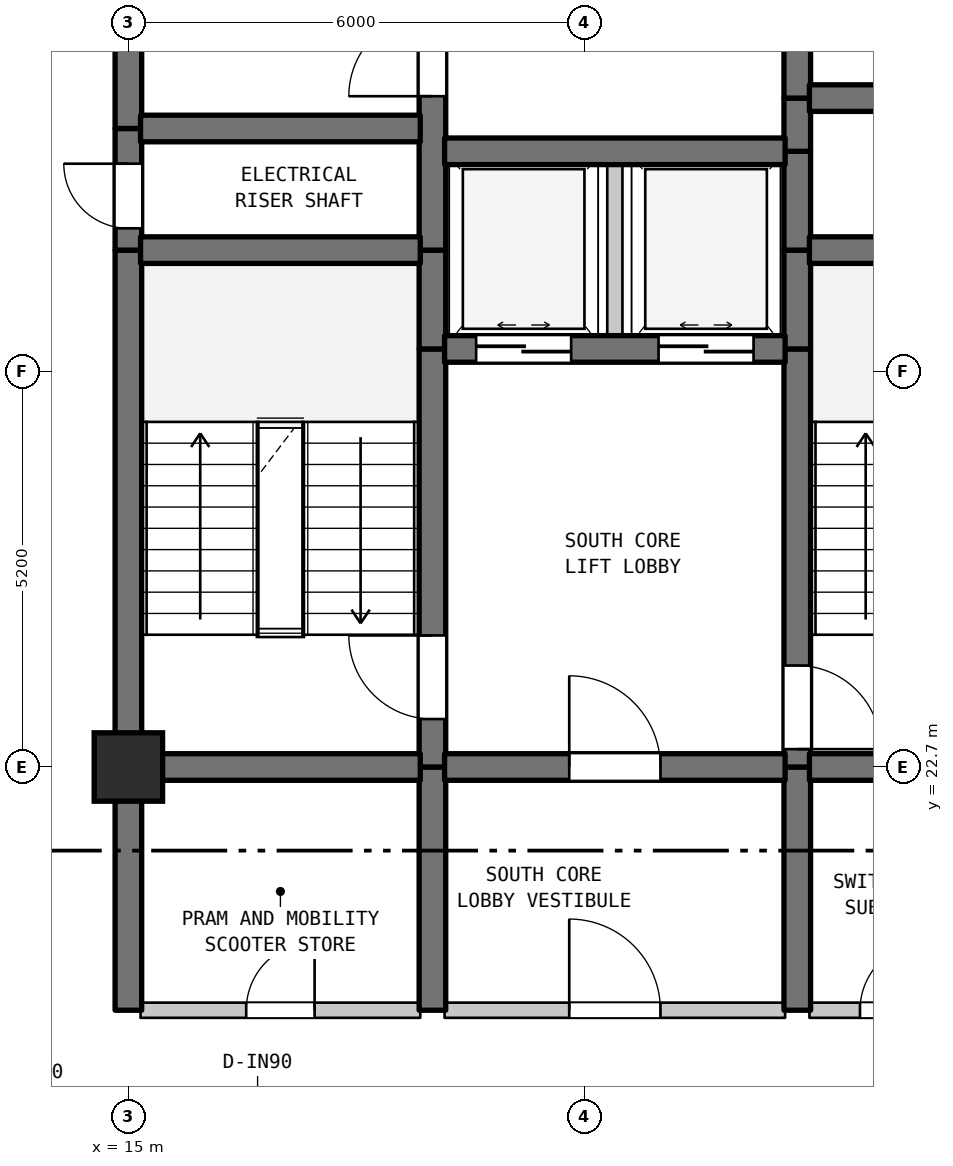
"""IFC4 building model, lengths in metres.
Left out: names, types, materials, properties, quantities, classifications, styles, units other than length and angle.
Written with IfcOpenShell. Run it as: python <this file> out.ifc"""

import sys

from ifc_helpers import new_model, si_unit, direction, frame, frame_2d, origin, origin_2d, place, context, subcontext, project, spatial, rectangle, extrude, element, fill, save


model = new_model("IFC4")
c1 = context("Model", 3, precision=1e-05, world=origin(), true_north=direction((0.0, 1.0)))
c2 = subcontext(c1, "Body", "Model", "MODEL_VIEW")
j1 = project(units=[si_unit("LENGTHUNIT", "METRE"), si_unit("PLANEANGLEUNIT", "RADIAN")], contexts=[c1])
p1 = place(None, origin())
s1 = spatial("IfcSite", under=j1, at=p1, CompositionType="ELEMENT")
p2 = place(p1, origin())
s2 = spatial("IfcBuilding", under=s1, at=p2, CompositionType="ELEMENT")
p3 = place(p2, frame((0.0, 0.0, 203.2)))
s3 = spatial("IfcBuildingStorey", under=s2, at=p3, CompositionType="ELEMENT", Elevation=203.2)
p4 = place(p3, frame((15.0, 22.7, 0.0), z_axis=(0.0, 0.0, 1.0), x_axis=(1.0, 0.0, 0.0)))
e1 = element("IfcColumn", 1, at=p4, inside=s3, PredefinedType="COLUMN", context=c2, shape_type="SweptSolid", body=[
    extrude(rectangle(XDim=0.9, YDim=0.9, at=origin_2d()), origin(), (0.0, 0.0, 1.0), 3.7),
])
p5 = place(p3, frame((15.0, 19.5, 0.0), z_axis=(0.0, 0.0, 1.0), x_axis=(0.0, 1.0, 0.0)))
e2 = element("IfcWall", 2, at=p5, inside=s3, PredefinedType="SHEAR", context=c2, shape_type="SweptSolid", body=[
    extrude(rectangle(XDim=3.2, YDim=0.35, at=frame_2d((1.6, 0.0))), origin(), (0.0, 0.0, 1.0), 3.39),
])
p6 = place(p3, frame((15.0, 22.7, 0.0), z_axis=(0.0, 0.0, 1.0), x_axis=(0.0, 1.0, 0.0)))
e3 = element("IfcWall", 3, at=p6, inside=s3, PredefinedType="SHEAR", context=c2, shape_type="SweptSolid", body=[
    extrude(rectangle(XDim=6.8, YDim=0.35, at=frame_2d((3.4, 0.0))), origin(), (0.0, 0.0, 1.0), 3.39),
])
p7 = place(p3, frame((15.0, 29.5, 0.0), z_axis=(0.0, 0.0, 1.0), x_axis=(0.0, 1.0, 0.0)))
e4 = element("IfcWall", 4, at=p7, inside=s3, PredefinedType="SHEAR", context=c2, shape_type="SweptSolid", body=[
    extrude(rectangle(XDim=1.6, YDim=0.35, at=frame_2d((0.8, 0.0))), origin(), (0.0, 0.0, 1.0), 3.39),
])
p8 = place(p7, frame((0.287, 0.0, 0.0)))
e5 = element("IfcOpeningElement", 5, at=p8, cuts=e4, PredefinedType="OPENING", context=c2, shape_type="SweptSolid", body=[
    extrude(rectangle(XDim=0.85, YDim=2.1, at=frame_2d((0.425, 1.05))), frame((0.0, 0.185, 0.0), z_axis=(0.0, -1.0, 0.0), x_axis=(1.0, 0.0, 0.0)), (0.0, 0.0, 1.0), 0.37),
])
p9 = place(p3, frame((15.0, 31.1, 0.0), z_axis=(0.0, 0.0, 1.0), x_axis=(0.0, 1.0, 0.0)))
e6 = element("IfcWall", 6, at=p9, inside=s3, PredefinedType="SHEAR", context=c2, shape_type="SweptSolid", body=[
    extrude(rectangle(XDim=6.8, YDim=0.35, at=frame_2d((3.4, 0.0))), origin(), (0.0, 0.0, 1.0), 3.39),
])
p10 = place(p3, frame((19.0, 19.5, 0.0), z_axis=(0.0, 0.0, 1.0), x_axis=(0.0, 1.0, 0.0)))
e7 = element("IfcWall", 7, at=p10, inside=s3, PredefinedType="SHEAR", context=c2, shape_type="SweptSolid", body=[
    extrude(rectangle(XDim=3.2, YDim=0.35, at=frame_2d((1.6, 0.0))), origin(), (0.0, 0.0, 1.0), 3.39),
])
p11 = place(p3, frame((19.0, 22.7, 0.0), z_axis=(0.0, 0.0, 1.0), x_axis=(0.0, 1.0, 0.0)))
e8 = element("IfcWall", 8, at=p11, inside=s3, PredefinedType="SHEAR", context=c2, shape_type="SweptSolid", body=[
    extrude(rectangle(XDim=5.5, YDim=0.35, at=frame_2d((2.75, 0.0))), origin(), (0.0, 0.0, 1.0), 3.39),
])
p12 = place(p11, frame((0.631, 0.0, 0.0)))
e9 = element("IfcOpeningElement", 9, at=p12, cuts=e8, PredefinedType="OPENING", context=c2, shape_type="SweptSolid", body=[
    extrude(rectangle(XDim=1.1, YDim=2.15, at=frame_2d((0.55, 1.075))), frame((0.0, 0.185, 0.0), z_axis=(0.0, -1.0, 0.0), x_axis=(1.0, 0.0, 0.0)), (0.0, 0.0, 1.0), 0.37),
])
p13 = place(p3, frame((19.0, 28.2, 0.0), z_axis=(0.0, 0.0, 1.0), x_axis=(0.0, 1.0, 0.0)))
e10 = element("IfcWall", 10, at=p13, inside=s3, PredefinedType="SHEAR", context=c2, shape_type="SweptSolid", body=[
    extrude(rectangle(XDim=1.3, YDim=0.35, at=frame_2d((0.65, 0.0))), origin(), (0.0, 0.0, 1.0), 3.39),
])
p14 = place(p3, frame((19.0, 29.5, 0.0), z_axis=(0.0, 0.0, 1.0), x_axis=(0.0, 1.0, 0.0)))
e11 = element("IfcWall", 11, at=p14, inside=s3, PredefinedType="SHEAR", context=c2, shape_type="SweptSolid", body=[
    extrude(rectangle(XDim=5.5, YDim=0.35, at=frame_2d((2.75, 0.0))), origin(), (0.0, 0.0, 1.0), 3.39),
])
p15 = place(p14, frame((2.025, 0.0, 0.0)))
e12 = element("IfcOpeningElement", 12, at=p15, cuts=e11, PredefinedType="OPENING", context=c2, shape_type="SweptSolid", body=[
    extrude(rectangle(XDim=1.1, YDim=2.15, at=frame_2d((0.55, 1.075))), frame((0.0, 0.185, 0.0), z_axis=(0.0, -1.0, 0.0), x_axis=(1.0, 0.0, 0.0)), (0.0, 0.0, 1.0), 0.37),
])
p16 = place(p3, frame((21.4, 28.2, 0.0), z_axis=(0.0, 0.0, 1.0), x_axis=(0.0, 1.0, 0.0)))
e13 = element("IfcWall", 13, at=p16, inside=s3, PredefinedType="STANDARD", context=c2, shape_type="SweptSolid", body=[
    extrude(rectangle(XDim=2.6, YDim=0.2, at=frame_2d((1.3, 0.0))), origin(), (0.0, 0.0, 1.0), 3.39),
])
p17 = place(p3, frame((23.8, 19.5, 0.0), z_axis=(0.0, 0.0, 1.0), x_axis=(0.0, 1.0, 0.0)))
e14 = element("IfcWall", 14, at=p17, inside=s3, PredefinedType="SHEAR", context=c2, shape_type="SweptSolid", body=[
    extrude(rectangle(XDim=3.2, YDim=0.35, at=frame_2d((1.6, 0.0))), origin(), (0.0, 0.0, 1.0), 3.39),
])
p18 = place(p3, frame((23.8, 22.7, 0.0), z_axis=(0.0, 0.0, 1.0), x_axis=(0.0, 1.0, 0.0)))
e15 = element("IfcWall", 15, at=p18, inside=s3, PredefinedType="SHEAR", context=c2, shape_type="SweptSolid", body=[
    extrude(rectangle(XDim=5.5, YDim=0.35, at=frame_2d((2.75, 0.0))), origin(), (0.0, 0.0, 1.0), 3.39),
])
p19 = place(p18, frame((0.235, 0.0, 0.0)))
e16 = element("IfcOpeningElement", 16, at=p19, cuts=e15, PredefinedType="OPENING", context=c2, shape_type="SweptSolid", body=[
    extrude(rectangle(XDim=1.1, YDim=2.15, at=frame_2d((0.55, 1.075))), frame((0.0, 0.185, 0.0), z_axis=(0.0, -1.0, 0.0), x_axis=(1.0, 0.0, 0.0)), (0.0, 0.0, 1.0), 0.37),
])
for number, where, z_axis, x_axis in (
    (17, (23.8, 28.2, 0.0), (0.0, 0.0, 1.0), (0.0, 1.0, 0.0)),
    (18, (23.8, 29.5, 0.0), (0.0, 0.0, 1.0), (0.0, 1.0, 0.0)),
):
    element("IfcWall", number, at=place(p3, frame(where, z_axis=z_axis, x_axis=x_axis)), inside=s3, PredefinedType="SHEAR", context=c2, shape_type="SweptSolid", body=[
        extrude(rectangle(XDim=1.3, YDim=0.35, at=frame_2d((0.65, 0.0))), origin(), (0.0, 0.0, 1.0), 3.39),
    ])
p20 = place(p3, frame((23.8, 30.8, 0.0), z_axis=(0.0, 0.0, 1.0), x_axis=(0.0, 1.0, 0.0)))
e19 = element("IfcWall", 19, at=p20, inside=s3, PredefinedType="SHEAR", context=c2, shape_type="SweptSolid", body=[
    extrude(rectangle(XDim=0.7, YDim=0.35, at=frame_2d((0.35, 0.0))), origin(), (0.0, 0.0, 1.0), 3.39),
])
p21 = place(p3, frame((23.8, 31.5, 0.0), z_axis=(0.0, 0.0, 1.0), x_axis=(0.0, 1.0, 0.0)))
e20 = element("IfcWall", 20, at=p21, inside=s3, PredefinedType="SHEAR", context=c2, shape_type="SweptSolid", body=[
    extrude(rectangle(XDim=3.5, YDim=0.35, at=frame_2d((1.75, 0.0))), origin(), (0.0, 0.0, 1.0), 3.39),
])
p22 = place(p21, frame((1.127, 0.0, 0.0)))
e21 = element("IfcOpeningElement", 21, at=p22, cuts=e20, PredefinedType="OPENING", context=c2, shape_type="SweptSolid", body=[
    extrude(rectangle(XDim=1.1, YDim=2.15, at=frame_2d((0.55, 1.075))), frame((0.0, 0.185, 0.0), z_axis=(0.0, -1.0, 0.0), x_axis=(1.0, 0.0, 0.0)), (0.0, 0.0, 1.0), 0.37),
])
p23 = place(p3, frame((15.16, 19.5, 0.0), z_axis=(0.0, 0.0, 1.0), x_axis=(1.0, 0.0, 0.0)))
e22 = element("IfcWall", 22, at=p23, inside=s3, PredefinedType="STANDARD", context=c2, shape_type="SweptSolid", body=[
    extrude(rectangle(XDim=3.68, YDim=0.2, at=frame_2d((1.84, 0.0))), origin(), (0.0, 0.0, 1.0), 3.39),
])
p24 = place(p23, frame((1.39, 0.0, 0.0)))
e23 = element("IfcOpeningElement", 23, at=p24, cuts=e22, PredefinedType="OPENING", context=c2, shape_type="SweptSolid", body=[
    extrude(rectangle(XDim=0.9, YDim=2.15, at=frame_2d((0.45, 1.075))), frame((0.0, 0.11, 0.0), z_axis=(0.0, -1.0, 0.0), x_axis=(1.0, 0.0, 0.0)), (0.0, 0.0, 1.0), 0.22),
])
p25 = place(p3, frame((19.16, 19.5, 0.0), z_axis=(0.0, 0.0, 1.0), x_axis=(1.0, 0.0, 0.0)))
e24 = element("IfcWall", 24, at=p25, inside=s3, PredefinedType="STANDARD", context=c2, shape_type="SweptSolid", body=[
    extrude(rectangle(XDim=4.48, YDim=0.2, at=frame_2d((2.24, 0.0))), origin(), (0.0, 0.0, 1.0), 3.39),
])
p26 = place(p25, frame((1.64, 0.0, 0.0)))
e25 = element("IfcOpeningElement", 25, at=p26, cuts=e24, PredefinedType="OPENING", context=c2, shape_type="SweptSolid", body=[
    extrude(rectangle(XDim=1.2, YDim=2.2, at=frame_2d((0.6, 1.1))), frame((0.0, 0.11, 0.0), z_axis=(0.0, -1.0, 0.0), x_axis=(1.0, 0.0, 0.0)), (0.0, 0.0, 1.0), 0.22),
])
p27 = place(p3, frame((23.96, 19.5, 0.0), z_axis=(0.0, 0.0, 1.0), x_axis=(1.0, 0.0, 0.0)))
e26 = element("IfcWall", 26, at=p27, inside=s3, PredefinedType="STANDARD", context=c2, shape_type="SweptSolid", body=[
    extrude(rectangle(XDim=4.455, YDim=0.2, at=frame_2d((2.228, 0.0))), origin(), (0.0, 0.0, 1.0), 3.39),
])
p28 = place(p27, frame((0.665, 0.0, 0.0)))
e27 = element("IfcOpeningElement", 27, at=p28, cuts=e26, PredefinedType="OPENING", context=c2, shape_type="SweptSolid", body=[
    extrude(rectangle(XDim=0.9, YDim=2.15, at=frame_2d((0.45, 1.075))), frame((0.0, 0.11, 0.0), z_axis=(0.0, -1.0, 0.0), x_axis=(1.0, 0.0, 0.0)), (0.0, 0.0, 1.0), 0.22),
])
p29 = place(p27, frame((2.791, 0.0, 0.0)))
e28 = element("IfcOpeningElement", 28, at=p29, cuts=e26, PredefinedType="OPENING", context=c2, shape_type="SweptSolid", body=[
    extrude(rectangle(XDim=0.9, YDim=2.15, at=frame_2d((0.45, 1.075))), frame((0.0, 0.11, 0.0), z_axis=(0.0, -1.0, 0.0), x_axis=(1.0, 0.0, 0.0)), (0.0, 0.0, 1.0), 0.22),
])
p30 = place(p3, frame((15.16, 22.7, 0.0), z_axis=(0.0, 0.0, 1.0), x_axis=(1.0, 0.0, 0.0)))
e29 = element("IfcWall", 29, at=p30, inside=s3, PredefinedType="SHEAR", context=c2, shape_type="SweptSolid", body=[
    extrude(rectangle(XDim=3.68, YDim=0.35, at=frame_2d((1.84, 0.0))), origin(), (0.0, 0.0, 1.0), 3.39),
])
p31 = place(p3, frame((19.16, 22.7, 0.0), z_axis=(0.0, 0.0, 1.0), x_axis=(1.0, 0.0, 0.0)))
e30 = element("IfcWall", 30, at=p31, inside=s3, PredefinedType="SHEAR", context=c2, shape_type="SweptSolid", body=[
    extrude(rectangle(XDim=4.48, YDim=0.35, at=frame_2d((2.24, 0.0))), origin(), (0.0, 0.0, 1.0), 3.39),
])
p32 = place(p31, frame((1.64, 0.0, 0.0)))
e31 = element("IfcOpeningElement", 31, at=p32, cuts=e30, PredefinedType="OPENING", context=c2, shape_type="SweptSolid", body=[
    extrude(rectangle(XDim=1.2, YDim=2.2, at=frame_2d((0.6, 1.1))), frame((0.0, 0.185, 0.0), z_axis=(0.0, -1.0, 0.0), x_axis=(1.0, 0.0, 0.0)), (0.0, 0.0, 1.0), 0.37),
])
p33 = place(p3, frame((23.96, 22.7, 0.0), z_axis=(0.0, 0.0, 1.0), x_axis=(1.0, 0.0, 0.0)))
e32 = element("IfcWall", 32, at=p33, inside=s3, PredefinedType="SHEAR", context=c2, shape_type="SweptSolid", body=[
    extrude(rectangle(XDim=3.18, YDim=0.35, at=frame_2d((1.59, 0.0))), origin(), (0.0, 0.0, 1.0), 3.39),
])
p34 = place(p3, frame((19.16, 28.2, 0.0), z_axis=(0.0, 0.0, 1.0), x_axis=(1.0, 0.0, 0.0)))
e33 = element("IfcWall", 33, at=p34, inside=s3, PredefinedType="SHEAR", context=c2, shape_type="SweptSolid", body=[
    extrude(rectangle(XDim=4.48, YDim=0.35, at=frame_2d((2.24, 0.0))), origin(), (0.0, 0.0, 1.0), 3.39),
])
p35 = place(p34, frame((0.415, 0.0, 0.0)))
e34 = element("IfcOpeningElement", 34, at=p35, cuts=e33, PredefinedType="OPENING", context=c2, shape_type="SweptSolid", body=[
    extrude(rectangle(XDim=1.25, YDim=2.2, at=frame_2d((0.625, 1.1))), frame((0.0, 0.185, 0.0), z_axis=(0.0, -1.0, 0.0), x_axis=(1.0, 0.0, 0.0)), (0.0, 0.0, 1.0), 0.37),
])
p36 = place(p34, frame((2.815, 0.0, 0.0)))
e35 = element("IfcOpeningElement", 35, at=p36, cuts=e33, PredefinedType="OPENING", context=c2, shape_type="SweptSolid", body=[
    extrude(rectangle(XDim=1.25, YDim=2.2, at=frame_2d((0.625, 1.1))), frame((0.0, 0.185, 0.0), z_axis=(0.0, -1.0, 0.0), x_axis=(1.0, 0.0, 0.0)), (0.0, 0.0, 1.0), 0.37),
])
p37 = place(p3, frame((15.16, 29.5, 0.0), z_axis=(0.0, 0.0, 1.0), x_axis=(1.0, 0.0, 0.0)))
e36 = element("IfcWall", 36, at=p37, inside=s3, PredefinedType="SHEAR", context=c2, shape_type="SweptSolid", body=[
    extrude(rectangle(XDim=3.68, YDim=0.35, at=frame_2d((1.84, 0.0))), origin(), (0.0, 0.0, 1.0), 3.39),
])
p38 = place(p3, frame((23.96, 29.5, 0.0), z_axis=(0.0, 0.0, 1.0), x_axis=(1.0, 0.0, 0.0)))
e37 = element("IfcWall", 37, at=p38, inside=s3, PredefinedType="SHEAR", context=c2, shape_type="SweptSolid", body=[
    extrude(rectangle(XDim=3.18, YDim=0.35, at=frame_2d((1.59, 0.0))), origin(), (0.0, 0.0, 1.0), 3.39),
])
p39 = place(p3, frame((19.16, 30.8, 0.0), z_axis=(0.0, 0.0, 1.0), x_axis=(1.0, 0.0, 0.0)))
e38 = element("IfcWall", 38, at=p39, inside=s3, PredefinedType="SHEAR", context=c2, shape_type="SweptSolid", body=[
    extrude(rectangle(XDim=4.48, YDim=0.35, at=frame_2d((2.24, 0.0))), origin(), (0.0, 0.0, 1.0), 3.39),
])
p40 = place(p3, frame((15.16, 31.1, 0.0), z_axis=(0.0, 0.0, 1.0), x_axis=(1.0, 0.0, 0.0)))
e39 = element("IfcWall", 39, at=p40, inside=s3, PredefinedType="SHEAR", context=c2, shape_type="SweptSolid", body=[
    extrude(rectangle(XDim=3.68, YDim=0.35, at=frame_2d((1.84, 0.0))), origin(), (0.0, 0.0, 1.0), 3.39),
])
p41 = place(p3, frame((23.96, 31.5, 0.0), z_axis=(0.0, 0.0, 1.0), x_axis=(1.0, 0.0, 0.0)))
e40 = element("IfcWall", 40, at=p41, inside=s3, PredefinedType="SHEAR", context=c2, shape_type="SweptSolid", body=[
    extrude(rectangle(XDim=3.18, YDim=0.35, at=frame_2d((1.59, 0.0))), origin(), (0.0, 0.0, 1.0), 3.39),
])
p42 = place(p41, frame((1.094, 0.0, 0.0)))
e41 = element("IfcOpeningElement", 41, at=p42, cuts=e40, PredefinedType="OPENING", context=c2, shape_type="SweptSolid", body=[
    extrude(rectangle(XDim=0.85, YDim=2.1, at=frame_2d((0.425, 1.05))), frame((0.0, 0.185, 0.0), z_axis=(0.0, -1.0, 0.0), x_axis=(1.0, 0.0, 0.0)), (0.0, 0.0, 1.0), 0.37),
])
p43 = place(p8, origin())
e42 = element("IfcDoor", 42, at=p43, inside=s3, OperationType="SINGLE_SWING_RIGHT", PredefinedType="DOOR", context=c2, shape_type="SweptSolid", body=[
    extrude(rectangle(XDim=0.85, YDim=2.1, at=frame_2d((0.425, 1.05))), frame((0.0, 0.025, 0.0), z_axis=(0.0, -1.0, 0.0), x_axis=(1.0, 0.0, 0.0)), (0.0, 0.0, 1.0), 0.05),
])
fill(e5, e42)
p44 = place(p12, origin())
e43 = element("IfcDoor", 43, at=p44, inside=s3, OperationType="SINGLE_SWING_RIGHT", PredefinedType="DOOR", context=c2, shape_type="SweptSolid", body=[
    extrude(rectangle(XDim=1.1, YDim=2.15, at=frame_2d((0.55, 1.075))), frame((0.0, 0.025, 0.0), z_axis=(0.0, -1.0, 0.0), x_axis=(1.0, 0.0, 0.0)), (0.0, 0.0, 1.0), 0.05),
])
fill(e9, e43)
p45 = place(p15, origin())
e44 = element("IfcDoor", 44, at=p45, inside=s3, OperationType="SINGLE_SWING_LEFT", PredefinedType="DOOR", context=c2, shape_type="SweptSolid", body=[
    extrude(rectangle(XDim=1.1, YDim=2.15, at=frame_2d((0.55, 1.075))), frame((0.0, 0.025, 0.0), z_axis=(0.0, -1.0, 0.0), x_axis=(1.0, 0.0, 0.0)), (0.0, 0.0, 1.0), 0.05),
])
fill(e12, e44)
p46 = place(p19, frame((1.1, 0.0, 0.0), z_axis=(0.0, 0.0, 1.0), x_axis=(-1.0, 0.0, 0.0)))
e45 = element("IfcDoor", 45, at=p46, inside=s3, OperationType="SINGLE_SWING_LEFT", PredefinedType="DOOR", context=c2, shape_type="SweptSolid", body=[
    extrude(rectangle(XDim=1.1, YDim=2.15, at=frame_2d((0.55, 1.075))), frame((0.0, 0.025, 0.0), z_axis=(0.0, -1.0, 0.0), x_axis=(1.0, 0.0, 0.0)), (0.0, 0.0, 1.0), 0.05),
])
fill(e16, e45)
p47 = place(p24, origin())
e46 = element("IfcDoor", 46, at=p47, inside=s3, OperationType="SINGLE_SWING_RIGHT", PredefinedType="DOOR", context=c2, shape_type="SweptSolid", body=[
    extrude(rectangle(XDim=0.9, YDim=2.15, at=frame_2d((0.45, 1.075))), frame((0.0, 0.025, 0.0), z_axis=(0.0, -1.0, 0.0), x_axis=(1.0, 0.0, 0.0)), (0.0, 0.0, 1.0), 0.05),
])
fill(e23, e46)
p48 = place(p26, origin())
e47 = element("IfcDoor", 47, at=p48, inside=s3, OperationType="SINGLE_SWING_LEFT", PredefinedType="DOOR", context=c2, shape_type="SweptSolid", body=[
    extrude(rectangle(XDim=1.2, YDim=2.2, at=frame_2d((0.6, 1.1))), frame((0.0, 0.025, 0.0), z_axis=(0.0, -1.0, 0.0), x_axis=(1.0, 0.0, 0.0)), (0.0, 0.0, 1.0), 0.05),
])
fill(e25, e47)
p49 = place(p28, origin())
e48 = element("IfcDoor", 48, at=p49, inside=s3, OperationType="SINGLE_SWING_RIGHT", PredefinedType="DOOR", context=c2, shape_type="SweptSolid", body=[
    extrude(rectangle(XDim=0.9, YDim=2.15, at=frame_2d((0.45, 1.075))), frame((0.0, 0.025, 0.0), z_axis=(0.0, -1.0, 0.0), x_axis=(1.0, 0.0, 0.0)), (0.0, 0.0, 1.0), 0.05),
])
fill(e27, e48)
p50 = place(p32, origin())
e49 = element("IfcDoor", 49, at=p50, inside=s3, OperationType="SINGLE_SWING_LEFT", PredefinedType="DOOR", context=c2, shape_type="SweptSolid", body=[
    extrude(rectangle(XDim=1.2, YDim=2.2, at=frame_2d((0.6, 1.1))), frame((0.0, 0.025, 0.0), z_axis=(0.0, -1.0, 0.0), x_axis=(1.0, 0.0, 0.0)), (0.0, 0.0, 1.0), 0.05),
])
fill(e31, e49)
p51 = place(p35, origin())
e50 = element("IfcDoor", 50, at=p51, inside=s3, OperationType="DOUBLE_DOOR_SLIDING", PredefinedType="DOOR", context=c2, shape_type="SweptSolid", body=[
    extrude(rectangle(XDim=1.25, YDim=2.2, at=frame_2d((0.625, 1.1))), frame((0.0, 0.025, 0.0), z_axis=(0.0, -1.0, 0.0), x_axis=(1.0, 0.0, 0.0)), (0.0, 0.0, 1.0), 0.05),
])
fill(e34, e50)
p52 = place(p36, origin())
e51 = element("IfcDoor", 51, at=p52, inside=s3, OperationType="DOUBLE_DOOR_SLIDING", PredefinedType="DOOR", context=c2, shape_type="SweptSolid", body=[
    extrude(rectangle(XDim=1.25, YDim=2.2, at=frame_2d((0.625, 1.1))), frame((0.0, 0.025, 0.0), z_axis=(0.0, -1.0, 0.0), x_axis=(1.0, 0.0, 0.0)), (0.0, 0.0, 1.0), 0.05),
])
fill(e35, e51)
save(model, sys.argv[1])
